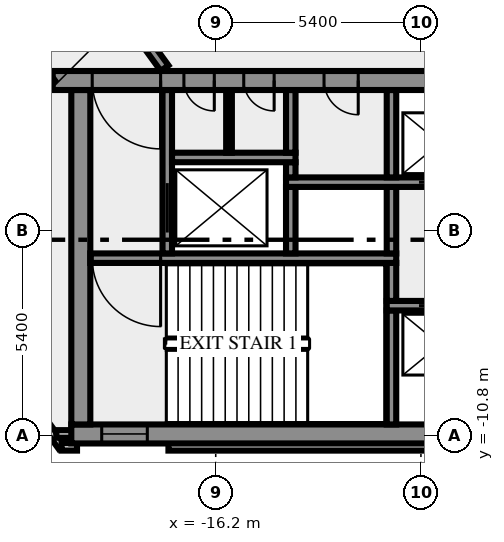
"""IFC4 building model, lengths in metres.
Left out: names, types, materials, properties, quantities, classifications, styles, units other than length and angle.
Written with IfcOpenShell. Run it as: python <this file> out.ifc"""

import sys

from ifc_helpers import new_model, si_unit, direction, frame, frame_2d, origin, place, context, subcontext, project, spatial, rectangle, extrude, element, fill, save


model = new_model("IFC4")
c1 = context("Model", 3, precision=1e-05, world=origin(), true_north=direction((0.0, 1.0)))
c2 = subcontext(c1, "Body", "Model", "MODEL_VIEW")
j1 = project(units=[si_unit("LENGTHUNIT", "METRE"), si_unit("PLANEANGLEUNIT", "RADIAN")], contexts=[c1])
p1 = place(None, origin())
s1 = spatial("IfcSite", under=j1, at=p1, CompositionType="ELEMENT")
p2 = place(p1, origin())
s2 = spatial("IfcBuilding", under=s1, at=p2, CompositionType="ELEMENT")
p3 = place(p2, frame((0.0, 0.0, 35.0)))
s3 = spatial("IfcBuildingStorey", under=s2, at=p3, CompositionType="ELEMENT", Elevation=35.0)
p4 = place(p3, frame((-21.833, -8.909, 0.0), z_axis=(0.0, 0.0, 1.0), x_axis=(0.587766567315, -0.809030569476, 0.0)))
e1 = element("IfcWall", 1, at=p4, inside=s3, PredefinedType="SOLIDWALL", context=c2, shape_type="SweptSolid", body=[
    extrude(rectangle(XDim=2.688, YDim=0.2, at=frame_2d((1.344, 0.0))), origin(), (0.0, 0.0, 1.0), 3.65),
])
p5 = place(p3, frame((-20.256, -11.088, 0.0), z_axis=(0.0, 0.0, 1.0), x_axis=(1.0, 0.0, 0.0)))
e2 = element("IfcWall", 2, at=p5, inside=s3, PredefinedType="SOLIDWALL", context=c2, shape_type="SweptSolid", body=[
    extrude(rectangle(XDim=0.406, YDim=0.2, at=frame_2d((0.203, 0.0))), origin(), (0.0, 0.0, 1.0), 3.65),
])
p6 = place(p3, frame((-17.444, -11.088, 0.0), z_axis=(0.0, 0.0, 1.0), x_axis=(1.0, 0.0, 0.0)))
e3 = element("IfcWall", 3, at=p6, inside=s3, PredefinedType="SOLIDWALL", context=c2, shape_type="SweptSolid", body=[
    extrude(rectangle(XDim=34.888, YDim=0.2, at=frame_2d((17.444, 0.0))), origin(), (0.0, 0.0, 1.0), 3.65),
])
p7 = place(p3, frame((-19.98, -10.75, 0.0), z_axis=(0.0, 0.0, 1.0), x_axis=(-1.0, 0.0, 0.0)))
e4 = element("IfcWall", 4, at=p7, inside=s3, PredefinedType="SOLIDWALL", context=c2, shape_type="SweptSolid", body=[
    extrude(rectangle(XDim=0.417, YDim=0.2, at=frame_2d((0.208, 0.0))), origin(), (0.0, 0.0, 1.0), 3.65),
])
p8 = place(p3, frame((-20.0, -10.75, 0.0), z_axis=(0.0, 0.0, 1.0), x_axis=(1.0, 0.0, 0.0)))
e5 = element("IfcWall", 5, at=p8, inside=s3, PredefinedType="SHEAR", context=c2, shape_type="SweptSolid", body=[
    extrude(rectangle(XDim=40.0, YDim=0.5, at=frame_2d((20.0, 0.0))), origin(), (0.0, 0.0, 1.0), 3.65),
])
p9 = place(p8, frame((0.8, 0.0, 1.0)))
e6 = element("IfcOpeningElement", 6, at=p9, cuts=e5, PredefinedType="OPENING", context=c2, shape_type="SweptSolid", body=[
    extrude(rectangle(XDim=1.2, YDim=1.2, at=frame_2d((0.6, 0.6))), frame((0.0, 0.26, 0.0), z_axis=(0.0, -1.0, 0.0), x_axis=(1.0, 0.0, 0.0)), (0.0, 0.0, 1.0), 0.52),
])
p10 = place(p8, frame((38.0, 0.0, 1.0)))
e7 = element("IfcOpeningElement", 7, at=p10, cuts=e5, PredefinedType="OPENING", context=c2, shape_type="SweptSolid", body=[
    extrude(rectangle(XDim=1.2, YDim=1.2, at=frame_2d((0.6, 0.6))), frame((0.0, 0.26, 0.0), z_axis=(0.0, -1.0, 0.0), x_axis=(1.0, 0.0, 0.0)), (0.0, 0.0, 1.0), 0.52),
])
p11 = place(p3, frame((-19.75, -10.5, 0.0), z_axis=(0.0, 0.0, 1.0), x_axis=(0.0, 1.0, 0.0)))
e8 = element("IfcWall", 8, at=p11, inside=s3, PredefinedType="SHEAR", context=c2, shape_type="SweptSolid", body=[
    extrude(rectangle(XDim=8.8, YDim=0.5, at=frame_2d((4.4, 0.0))), origin(), (0.0, 0.0, 1.0), 3.65),
])
p12 = place(p3, frame((-11.575, -10.5, 0.0), z_axis=(0.0, 0.0, 1.0), x_axis=(0.0, 1.0, 0.0)))
e9 = element("IfcWall", 9, at=p12, inside=s3, PredefinedType="SHEAR", context=c2, shape_type="SweptSolid", body=[
    extrude(rectangle(XDim=3.0, YDim=0.25, at=frame_2d((1.5, 0.0))), origin(), (0.0, 0.0, 1.0), 3.65),
])
p13 = place(p3, frame((11.7, -7.375, 0.0), z_axis=(0.0, 0.0, 1.0), x_axis=(-1.0, 0.0, 0.0)))
e10 = element("IfcWall", 10, at=p13, inside=s3, PredefinedType="SHEAR", context=c2, shape_type="SweptSolid", body=[
    extrude(rectangle(XDim=23.4, YDim=0.25, at=frame_2d((11.7, 0.0))), origin(), (0.0, 0.0, 1.0), 3.65),
])
p14 = place(p13, frame((21.45, 0.0, 0.0)))
e11 = element("IfcOpeningElement", 11, at=p14, cuts=e10, PredefinedType="OPENING", context=c2, shape_type="SweptSolid", body=[
    extrude(rectangle(XDim=1.1, YDim=2.1, at=frame_2d((0.55, 1.05))), frame((0.0, 0.135, 0.0), z_axis=(0.0, -1.0, 0.0), x_axis=(1.0, 0.0, 0.0)), (0.0, 0.0, 1.0), 0.27),
])
p15 = place(p13, frame((18.95, 0.0, 0.0)))
e12 = element("IfcOpeningElement", 12, at=p15, cuts=e10, PredefinedType="OPENING", context=c2, shape_type="SweptSolid", body=[
    extrude(rectangle(XDim=1.1, YDim=2.1, at=frame_2d((0.55, 1.05))), frame((0.0, 0.135, 0.0), z_axis=(0.0, -1.0, 0.0), x_axis=(1.0, 0.0, 0.0)), (0.0, 0.0, 1.0), 0.27),
])
p16 = place(p13, frame((16.45, 0.0, 0.0)))
e13 = element("IfcOpeningElement", 13, at=p16, cuts=e10, PredefinedType="OPENING", context=c2, shape_type="SweptSolid", body=[
    extrude(rectangle(XDim=1.1, YDim=2.1, at=frame_2d((0.55, 1.05))), frame((0.0, 0.135, 0.0), z_axis=(0.0, -1.0, 0.0), x_axis=(1.0, 0.0, 0.0)), (0.0, 0.0, 1.0), 0.27),
])
p17 = place(p13, frame((14.4, 0.0, 0.0)))
e14 = element("IfcOpeningElement", 14, at=p17, cuts=e10, PredefinedType="OPENING", context=c2, shape_type="SweptSolid", body=[
    extrude(rectangle(XDim=0.9, YDim=2.1, at=frame_2d((0.45, 1.05))), frame((0.0, 0.135, 0.0), z_axis=(0.0, -1.0, 0.0), x_axis=(1.0, 0.0, 0.0)), (0.0, 0.0, 1.0), 0.27),
])
p18 = place(p13, frame((12.5, 0.0, 0.0)))
e15 = element("IfcOpeningElement", 15, at=p18, cuts=e10, PredefinedType="OPENING", context=c2, shape_type="SweptSolid", body=[
    extrude(rectangle(XDim=0.9, YDim=2.1, at=frame_2d((0.45, 1.05))), frame((0.0, 0.135, 0.0), z_axis=(0.0, -1.0, 0.0), x_axis=(1.0, 0.0, 0.0)), (0.0, 0.0, 1.0), 0.27),
])
p19 = place(p13, frame((10.6, 0.0, 0.0)))
e16 = element("IfcOpeningElement", 16, at=p19, cuts=e10, PredefinedType="OPENING", context=c2, shape_type="SweptSolid", body=[
    extrude(rectangle(XDim=0.9, YDim=2.1, at=frame_2d((0.45, 1.05))), frame((0.0, 0.135, 0.0), z_axis=(0.0, -1.0, 0.0), x_axis=(1.0, 0.0, 0.0)), (0.0, 0.0, 1.0), 0.27),
])
p20 = place(p3, frame((-11.575, -7.25, 0.0), z_axis=(0.0, 0.0, 1.0), x_axis=(0.0, 1.0, 0.0)))
e17 = element("IfcWall", 17, at=p20, inside=s3, PredefinedType="SHEAR", context=c2, shape_type="SweptSolid", body=[
    extrude(rectangle(XDim=1.0, YDim=0.25, at=frame_2d((0.5, 0.0))), origin(), (0.0, 0.0, 1.0), 3.65),
])
p21 = place(p3, frame((-11.45, -6.125, 0.0), z_axis=(0.0, 0.0, 1.0), x_axis=(-1.0, 0.0, 0.0)))
e18 = element("IfcWall", 18, at=p21, inside=s3, PredefinedType="SHEAR", context=c2, shape_type="SweptSolid", body=[
    extrude(rectangle(XDim=8.05, YDim=0.25, at=frame_2d((4.025, 0.0))), origin(), (0.0, 0.0, 1.0), 3.65),
])
p22 = place(p21, frame((6.2, 0.0, 0.0)))
e19 = element("IfcOpeningElement", 19, at=p22, cuts=e18, PredefinedType="OPENING", context=c2, shape_type="SweptSolid", body=[
    extrude(rectangle(XDim=1.8, YDim=2.1, at=frame_2d((0.9, 1.05))), frame((0.0, 0.135, 0.0), z_axis=(0.0, -1.0, 0.0), x_axis=(1.0, 0.0, 0.0)), (0.0, 0.0, 1.0), 0.27),
])
p23 = place(p3, frame((-17.475, -6.0, 0.0), z_axis=(0.0, 0.0, 1.0), x_axis=(0.0, 1.0, 0.0)))
e20 = element("IfcWall", 20, at=p23, inside=s3, PredefinedType="SHEAR", context=c2, shape_type="SweptSolid", body=[
    extrude(rectangle(XDim=4.3, YDim=0.25, at=frame_2d((2.15, 0.0))), origin(), (0.0, 0.0, 1.0), 3.65),
])
p24 = place(p23, frame((0.55, 0.0, 0.0)))
e21 = element("IfcOpeningElement", 21, at=p24, cuts=e20, PredefinedType="OPENING", context=c2, shape_type="SweptSolid", body=[
    extrude(rectangle(XDim=1.3, YDim=2.1, at=frame_2d((0.65, 1.05))), frame((0.0, 0.135, 0.0), z_axis=(0.0, -1.0, 0.0), x_axis=(1.0, 0.0, 0.0)), (0.0, 0.0, 1.0), 0.27),
])
for number, where, z_axis, x_axis in (
    (22, (-14.225, -6.0, 0.0), (0.0, 0.0, 1.0), (0.0, 1.0, 0.0)),
    (23, (-11.575, -6.0, 0.0), (0.0, 0.0, 1.0), (0.0, 1.0, 0.0)),
):
    element("IfcWall", number, at=place(p3, frame(where, z_axis=z_axis, x_axis=x_axis)), inside=s3, PredefinedType="SHEAR", context=c2, shape_type="SweptSolid", body=[
        extrude(rectangle(XDim=1.75, YDim=0.25, at=frame_2d((0.875, 0.0))), origin(), (0.0, 0.0, 1.0), 3.65),
    ])
p25 = place(p3, frame((-14.35, -4.125, 0.0), z_axis=(0.0, 0.0, 1.0), x_axis=(1.0, 0.0, 0.0)))
e24 = element("IfcWall", 24, at=p25, inside=s3, PredefinedType="SHEAR", context=c2, shape_type="SweptSolid", body=[
    extrude(rectangle(XDim=10.4, YDim=0.25, at=frame_2d((5.2, 0.0))), origin(), (0.0, 0.0, 1.0), 3.65),
])
p26 = place(p25, frame((3.5, 0.0, 0.0)))
e25 = element("IfcOpeningElement", 25, at=p26, cuts=e24, PredefinedType="OPENING", context=c2, shape_type="SweptSolid", body=[
    extrude(rectangle(XDim=1.1, YDim=2.1, at=frame_2d((0.55, 1.05))), frame((0.0, 0.135, 0.0), z_axis=(0.0, -1.0, 0.0), x_axis=(1.0, 0.0, 0.0)), (0.0, 0.0, 1.0), 0.27),
])
p27 = place(p25, frame((6.0, 0.0, 0.0)))
e26 = element("IfcOpeningElement", 26, at=p27, cuts=e24, PredefinedType="OPENING", context=c2, shape_type="SweptSolid", body=[
    extrude(rectangle(XDim=1.1, YDim=2.1, at=frame_2d((0.55, 1.05))), frame((0.0, 0.135, 0.0), z_axis=(0.0, -1.0, 0.0), x_axis=(1.0, 0.0, 0.0)), (0.0, 0.0, 1.0), 0.27),
])
p28 = place(p25, frame((8.5, 0.0, 0.0)))
e27 = element("IfcOpeningElement", 27, at=p28, cuts=e24, PredefinedType="OPENING", context=c2, shape_type="SweptSolid", body=[
    extrude(rectangle(XDim=1.1, YDim=2.1, at=frame_2d((0.55, 1.05))), frame((0.0, 0.135, 0.0), z_axis=(0.0, -1.0, 0.0), x_axis=(1.0, 0.0, 0.0)), (0.0, 0.0, 1.0), 0.27),
])
p29 = place(p3, frame((-14.225, -4.0, 0.0), z_axis=(0.0, 0.0, 1.0), x_axis=(0.0, 1.0, 0.0)))
e28 = element("IfcWall", 28, at=p29, inside=s3, PredefinedType="SHEAR", context=c2, shape_type="SweptSolid", body=[
    extrude(rectangle(XDim=0.4, YDim=0.25, at=frame_2d((0.2, 0.0))), origin(), (0.0, 0.0, 1.0), 3.65),
])
p30 = place(p3, frame((-11.575, -4.0, 0.0), z_axis=(0.0, 0.0, 1.0), x_axis=(0.0, 1.0, 0.0)))
e29 = element("IfcWall", 29, at=p30, inside=s3, PredefinedType="SHEAR", context=c2, shape_type="SweptSolid", body=[
    extrude(rectangle(XDim=2.3, YDim=0.25, at=frame_2d((1.15, 0.0))), origin(), (0.0, 0.0, 1.0), 3.65),
])
p31 = place(p3, frame((-17.35, -3.475, 0.0), z_axis=(0.0, 0.0, 1.0), x_axis=(1.0, 0.0, 0.0)))
e30 = element("IfcWall", 30, at=p31, inside=s3, PredefinedType="SHEAR", context=c2, shape_type="SweptSolid", body=[
    extrude(rectangle(XDim=3.25, YDim=0.25, at=frame_2d((1.625, 0.0))), origin(), (0.0, 0.0, 1.0), 3.65),
])
p32 = place(p3, frame((-15.85, -3.35, 0.0), z_axis=(0.0, 0.0, 1.0), x_axis=(0.0, 1.0, 0.0)))
e31 = element("IfcWall", 31, at=p32, inside=s3, PredefinedType="PARTITIONING", context=c2, shape_type="SweptSolid", body=[
    extrude(rectangle(XDim=1.65, YDim=0.15, at=frame_2d((0.825, 0.0))), origin(), (0.0, 0.0, 1.0), 3.65),
])
p33 = place(p3, frame((-14.225, -3.35, 0.0), z_axis=(0.0, 0.0, 1.0), x_axis=(0.0, 1.0, 0.0)))
e32 = element("IfcWall", 32, at=p33, inside=s3, PredefinedType="SHEAR", context=c2, shape_type="SweptSolid", body=[
    extrude(rectangle(XDim=1.65, YDim=0.25, at=frame_2d((0.825, 0.0))), origin(), (0.0, 0.0, 1.0), 3.65),
])
p34 = place(p3, frame((20.49, -1.45, 0.0), z_axis=(0.0, 0.0, 1.0), x_axis=(-1.0, 0.0, 0.0)))
e33 = element("IfcWall", 33, at=p34, inside=s3, PredefinedType="SHEAR", context=c2, shape_type="SweptSolid", body=[
    extrude(rectangle(XDim=40.98, YDim=0.5, at=frame_2d((20.49, 0.0))), origin(), (0.0, 0.0, 1.0), 3.65),
])
p35 = place(p34, frame((38.14, 0.0, 0.0)))
e34 = element("IfcOpeningElement", 34, at=p35, cuts=e33, PredefinedType="OPENING", context=c2, shape_type="SweptSolid", body=[
    extrude(rectangle(XDim=1.8, YDim=2.1, at=frame_2d((0.9, 1.05))), frame((0.0, 0.26, 0.0), z_axis=(0.0, -1.0, 0.0), x_axis=(1.0, 0.0, 0.0)), (0.0, 0.0, 1.0), 0.52),
])
p36 = place(p34, frame((36.728, 0.0, 0.0)))
e35 = element("IfcOpeningElement", 35, at=p36, cuts=e33, PredefinedType="OPENING", context=c2, shape_type="SweptSolid", body=[
    extrude(rectangle(XDim=0.8, YDim=2.1, at=frame_2d((0.4, 1.05))), frame((0.0, 0.26, 0.0), z_axis=(0.0, -1.0, 0.0), x_axis=(1.0, 0.0, 0.0)), (0.0, 0.0, 1.0), 0.52),
])
p37 = place(p34, frame((35.153, 0.0, 0.0)))
e36 = element("IfcOpeningElement", 36, at=p37, cuts=e33, PredefinedType="OPENING", context=c2, shape_type="SweptSolid", body=[
    extrude(rectangle(XDim=0.8, YDim=2.1, at=frame_2d((0.4, 1.05))), frame((0.0, 0.26, 0.0), z_axis=(0.0, -1.0, 0.0), x_axis=(1.0, 0.0, 0.0)), (0.0, 0.0, 1.0), 0.52),
])
p38 = place(p34, frame((32.94, 0.0, 0.0)))
e37 = element("IfcOpeningElement", 37, at=p38, cuts=e33, PredefinedType="OPENING", context=c2, shape_type="SweptSolid", body=[
    extrude(rectangle(XDim=0.9, YDim=2.1, at=frame_2d((0.45, 1.05))), frame((0.0, 0.26, 0.0), z_axis=(0.0, -1.0, 0.0), x_axis=(1.0, 0.0, 0.0)), (0.0, 0.0, 1.0), 0.52),
])
p39 = place(p34, frame((21.765, 0.0, 0.0)))
e38 = element("IfcOpeningElement", 38, at=p39, cuts=e33, PredefinedType="OPENING", context=c2, shape_type="SweptSolid", body=[
    extrude(rectangle(XDim=2.0, YDim=2.1, at=frame_2d((1.0, 1.05))), frame((0.0, 0.26, 0.0), z_axis=(0.0, -1.0, 0.0), x_axis=(1.0, 0.0, 0.0)), (0.0, 0.0, 1.0), 0.52),
])
p40 = place(p34, frame((7.14, 0.0, 0.0)))
e39 = element("IfcOpeningElement", 39, at=p40, cuts=e33, PredefinedType="OPENING", context=c2, shape_type="SweptSolid", body=[
    extrude(rectangle(XDim=0.9, YDim=2.1, at=frame_2d((0.45, 1.05))), frame((0.0, 0.26, 0.0), z_axis=(0.0, -1.0, 0.0), x_axis=(1.0, 0.0, 0.0)), (0.0, 0.0, 1.0), 0.52),
])
p41 = place(p34, frame((4.19, 0.0, 0.0)))
e40 = element("IfcOpeningElement", 40, at=p41, cuts=e33, PredefinedType="OPENING", context=c2, shape_type="SweptSolid", body=[
    extrude(rectangle(XDim=0.9, YDim=2.1, at=frame_2d((0.45, 1.05))), frame((0.0, 0.26, 0.0), z_axis=(0.0, -1.0, 0.0), x_axis=(1.0, 0.0, 0.0)), (0.0, 0.0, 1.0), 0.52),
])
p42 = place(p34, frame((1.04, 0.0, 0.0)))
e41 = element("IfcOpeningElement", 41, at=p42, cuts=e33, PredefinedType="OPENING", context=c2, shape_type="SweptSolid", body=[
    extrude(rectangle(XDim=1.8, YDim=2.1, at=frame_2d((0.9, 1.05))), frame((0.0, 0.26, 0.0), z_axis=(0.0, -1.0, 0.0), x_axis=(1.0, 0.0, 0.0)), (0.0, 0.0, 1.0), 0.52),
])
p43 = place(p3, frame((-20.531, -1.523, 0.0), z_axis=(0.0, 0.0, 1.0), x_axis=(-0.587784593204, 0.809017473231, 0.0)))
e42 = element("IfcWall", 42, at=p43, inside=s3, PredefinedType="SOLIDWALL", context=c2, shape_type="SweptSolid", body=[
    extrude(rectangle(XDim=44.67, YDim=0.25, at=frame_2d((22.335, 0.0))), origin(), (0.0, 0.0, 1.0), 3.65),
])
p44 = place(p43, frame((30.765, 0.0, 0.0)))
e43 = element("IfcOpeningElement", 43, at=p44, cuts=e42, PredefinedType="OPENING", context=c2, shape_type="SweptSolid", body=[
    extrude(rectangle(XDim=0.9, YDim=2.1, at=frame_2d((0.45, 1.05))), frame((0.0, 0.135, 0.0), z_axis=(0.0, -1.0, 0.0), x_axis=(1.0, 0.0, 0.0)), (0.0, 0.0, 1.0), 0.27),
])
p45 = place(p43, frame((14.316, 0.0, 0.0)))
e44 = element("IfcOpeningElement", 44, at=p45, cuts=e42, PredefinedType="OPENING", context=c2, shape_type="SweptSolid", body=[
    extrude(rectangle(XDim=0.9, YDim=2.1, at=frame_2d((0.45, 1.05))), frame((0.0, 0.135, 0.0), z_axis=(0.0, -1.0, 0.0), x_axis=(1.0, 0.0, 0.0)), (0.0, 0.0, 1.0), 0.27),
])
p46 = place(p43, frame((29.166, 0.0, 0.0)))
e45 = element("IfcOpeningElement", 45, at=p46, cuts=e42, PredefinedType="OPENING", context=c2, shape_type="SweptSolid", body=[
    extrude(rectangle(XDim=0.9, YDim=2.1, at=frame_2d((0.45, 1.05))), frame((0.0, 0.135, 0.0), z_axis=(0.0, -1.0, 0.0), x_axis=(1.0, 0.0, 0.0)), (0.0, 0.0, 1.0), 0.27),
])
p47 = place(p3, frame((-37.232, 25.972, 0.0), z_axis=(0.0, 0.0, 1.0), x_axis=(0.587786323093, -0.809016216391, 0.0)))
e46 = element("IfcWall", 46, at=p47, inside=s3, PredefinedType="SOLIDWALL", context=c2, shape_type="SweptSolid", body=[
    extrude(rectangle(XDim=33.493, YDim=0.25, at=frame_2d((16.747, 0.0))), origin(), (0.0, 0.0, 1.0), 3.65),
])
p48 = place(p47, frame((8.335, 0.0, 0.0)))
e47 = element("IfcOpeningElement", 47, at=p48, cuts=e46, PredefinedType="OPENING", context=c2, shape_type="SweptSolid", body=[
    extrude(rectangle(XDim=0.9, YDim=2.1, at=frame_2d((0.45, 1.05))), frame((0.0, 0.135, 0.0), z_axis=(0.0, -1.0, 0.0), x_axis=(1.0, 0.0, 0.0)), (0.0, 0.0, 1.0), 0.27),
])
p49 = place(p47, frame((29.152, 0.0, 0.0)))
e48 = element("IfcOpeningElement", 48, at=p49, cuts=e46, PredefinedType="OPENING", context=c2, shape_type="SweptSolid", body=[
    extrude(rectangle(XDim=0.9, YDim=2.1, at=frame_2d((0.45, 1.05))), frame((0.0, 0.135, 0.0), z_axis=(0.0, -1.0, 0.0), x_axis=(1.0, 0.0, 0.0)), (0.0, 0.0, 1.0), 0.27),
])
p50 = place(p47, frame((6.735, 0.0, 0.0)))
e49 = element("IfcOpeningElement", 49, at=p50, cuts=e46, PredefinedType="OPENING", context=c2, shape_type="SweptSolid", body=[
    extrude(rectangle(XDim=0.9, YDim=2.1, at=frame_2d((0.45, 1.05))), frame((0.0, 0.135, 0.0), z_axis=(0.0, -1.0, 0.0), x_axis=(1.0, 0.0, 0.0)), (0.0, 0.0, 1.0), 0.27),
])
p51 = place(p9, origin())
e50 = element("IfcWindow", 50, at=p51, inside=s3, PartitioningType="SINGLE_PANEL", PredefinedType="WINDOW", context=c2, shape_type="SweptSolid", body=[
    extrude(rectangle(XDim=1.2, YDim=1.2, at=frame_2d((0.6, 0.6))), frame((0.0, 0.03, 0.0), z_axis=(0.0, -1.0, 0.0), x_axis=(1.0, 0.0, 0.0)), (0.0, 0.0, 1.0), 0.06),
])
fill(e6, e50)
p52 = place(p14, origin())
e51 = element("IfcDoor", 51, at=p52, inside=s3, OperationType="DOUBLE_DOOR_SLIDING", PredefinedType="DOOR", context=c2, shape_type="SweptSolid", body=[
    extrude(rectangle(XDim=1.1, YDim=2.1, at=frame_2d((0.55, 1.05))), frame((0.0, 0.025, 0.0), z_axis=(0.0, -1.0, 0.0), x_axis=(1.0, 0.0, 0.0)), (0.0, 0.0, 1.0), 0.05),
])
fill(e11, e51)
p53 = place(p22, origin())
e52 = element("IfcDoor", 52, at=p53, inside=s3, OperationType="DOUBLE_DOOR_SINGLE_SWING", PredefinedType="DOOR", context=c2, shape_type="SweptSolid", body=[
    extrude(rectangle(XDim=1.8, YDim=2.1, at=frame_2d((0.9, 1.05))), frame((0.0, 0.025, 0.0), z_axis=(0.0, -1.0, 0.0), x_axis=(1.0, 0.0, 0.0)), (0.0, 0.0, 1.0), 0.05),
])
fill(e19, e52)
p54 = place(p24, origin())
e53 = element("IfcDoor", 53, at=p54, inside=s3, OperationType="DOUBLE_DOOR_SLIDING", PredefinedType="DOOR", context=c2, shape_type="SweptSolid", body=[
    extrude(rectangle(XDim=1.3, YDim=2.1, at=frame_2d((0.65, 1.05))), frame((0.0, 0.025, 0.0), z_axis=(0.0, -1.0, 0.0), x_axis=(1.0, 0.0, 0.0)), (0.0, 0.0, 1.0), 0.05),
])
fill(e21, e53)
p55 = place(p26, origin())
e54 = element("IfcDoor", 54, at=p55, inside=s3, OperationType="DOUBLE_DOOR_SLIDING", PredefinedType="DOOR", context=c2, shape_type="SweptSolid", body=[
    extrude(rectangle(XDim=1.1, YDim=2.1, at=frame_2d((0.55, 1.05))), frame((0.0, 0.025, 0.0), z_axis=(0.0, -1.0, 0.0), x_axis=(1.0, 0.0, 0.0)), (0.0, 0.0, 1.0), 0.05),
])
fill(e25, e54)
p56 = place(p35, origin())
e55 = element("IfcDoor", 55, at=p56, inside=s3, OperationType="DOUBLE_DOOR_SINGLE_SWING", PredefinedType="DOOR", context=c2, shape_type="SweptSolid", body=[
    extrude(rectangle(XDim=1.8, YDim=2.1, at=frame_2d((0.9, 1.05))), frame((0.0, 0.025, 0.0), z_axis=(0.0, -1.0, 0.0), x_axis=(1.0, 0.0, 0.0)), (0.0, 0.0, 1.0), 0.05),
])
fill(e34, e55)
p57 = place(p36, origin())
e56 = element("IfcDoor", 56, at=p57, inside=s3, OperationType="SINGLE_SWING_RIGHT", PredefinedType="DOOR", context=c2, shape_type="SweptSolid", body=[
    extrude(rectangle(XDim=0.8, YDim=2.1, at=frame_2d((0.4, 1.05))), frame((0.0, 0.025, 0.0), z_axis=(0.0, -1.0, 0.0), x_axis=(1.0, 0.0, 0.0)), (0.0, 0.0, 1.0), 0.05),
])
fill(e35, e56)
p58 = place(p37, origin())
e57 = element("IfcDoor", 57, at=p58, inside=s3, OperationType="SINGLE_SWING_RIGHT", PredefinedType="DOOR", context=c2, shape_type="SweptSolid", body=[
    extrude(rectangle(XDim=0.8, YDim=2.1, at=frame_2d((0.4, 1.05))), frame((0.0, 0.025, 0.0), z_axis=(0.0, -1.0, 0.0), x_axis=(1.0, 0.0, 0.0)), (0.0, 0.0, 1.0), 0.05),
])
fill(e36, e57)
p59 = place(p38, origin())
e58 = element("IfcDoor", 58, at=p59, inside=s3, OperationType="SINGLE_SWING_RIGHT", PredefinedType="DOOR", context=c2, shape_type="SweptSolid", body=[
    extrude(rectangle(XDim=0.9, YDim=2.1, at=frame_2d((0.45, 1.05))), frame((0.0, 0.025, 0.0), z_axis=(0.0, -1.0, 0.0), x_axis=(1.0, 0.0, 0.0)), (0.0, 0.0, 1.0), 0.05),
])
fill(e37, e58)
save(model, sys.argv[1])
